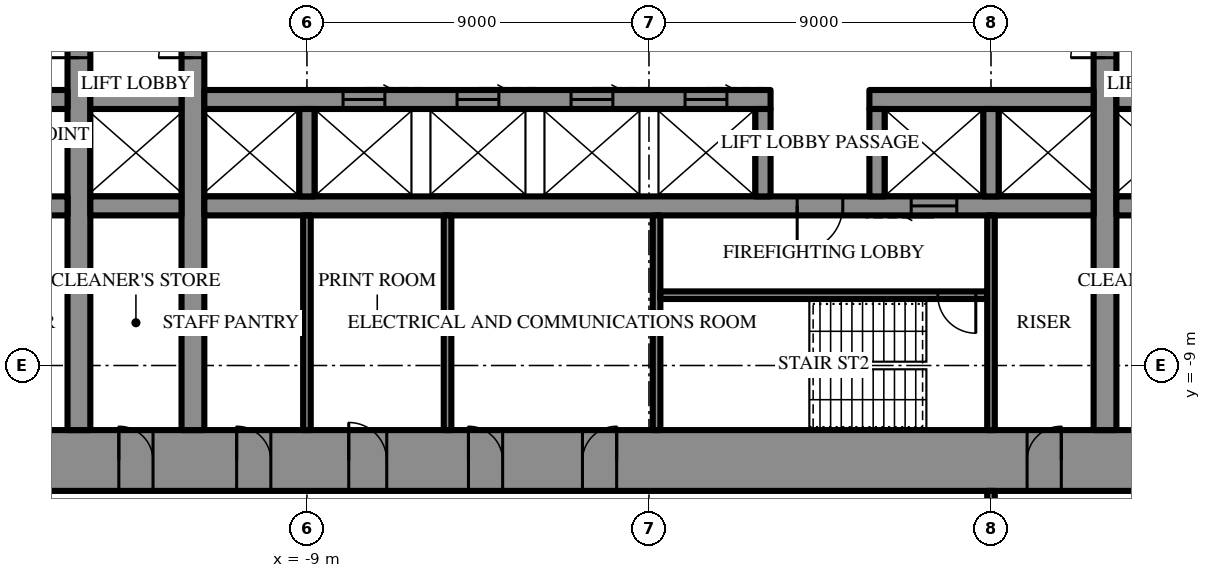
"""IFC4 building model, lengths in metres.
Left out: names, types, materials, properties, quantities, classifications, styles, units other than length and angle.
Written with IfcOpenShell. Run it as: python <this file> out.ifc"""

import sys

from ifc_helpers import new_model, si_unit, direction, frame, frame_2d, origin, place, context, subcontext, project, spatial, rectangle, extrude, element, fill, save


model = new_model("IFC4")
c1 = context("Model", 3, precision=1e-05, world=origin(), true_north=direction((0.0, 1.0)))
c2 = subcontext(c1, "Body", "Model", "MODEL_VIEW")
j1 = project(units=[si_unit("LENGTHUNIT", "METRE"), si_unit("PLANEANGLEUNIT", "RADIAN")], contexts=[c1])
p1 = place(None, origin())
s1 = spatial("IfcSite", under=j1, at=p1, CompositionType="ELEMENT")
p2 = place(p1, origin())
s2 = spatial("IfcBuilding", under=s1, at=p2, CompositionType="ELEMENT")
p3 = place(p2, frame((0.0, 0.0, 161.5)))
s3 = spatial("IfcBuildingStorey", under=s2, at=p3, CompositionType="ELEMENT", Elevation=161.5)
p4 = place(p3, frame((18.6, -11.5, 0.0), z_axis=(0.0, 0.0, 1.0), x_axis=(-1.0, 0.0, 0.0)))
e1 = element("IfcWall", 1, at=p4, inside=s3, PredefinedType="SHEAR", context=c2, shape_type="SweptSolid", body=[
    extrude(rectangle(XDim=37.2, YDim=1.6, at=frame_2d((18.6, 0.0))), origin(), (0.0, 0.0, 1.0), 4.2),
])
p5 = place(p4, frame((19.45, 0.0, 0.0)))
e2 = element("IfcOpeningElement", 2, at=p5, cuts=e1, PredefinedType="OPENING", context=c2, shape_type="SweptSolid", body=[
    extrude(rectangle(XDim=0.9, YDim=2.2, at=frame_2d((0.45, 1.1))), frame((0.0, 0.81, 0.0), z_axis=(0.0, -1.0, 0.0), x_axis=(1.0, 0.0, 0.0)), (0.0, 0.0, 1.0), 1.62),
])
p6 = place(p4, frame((22.45, 0.0, 0.0)))
e3 = element("IfcOpeningElement", 3, at=p6, cuts=e1, PredefinedType="OPENING", context=c2, shape_type="SweptSolid", body=[
    extrude(rectangle(XDim=0.9, YDim=2.2, at=frame_2d((0.45, 1.1))), frame((0.0, 0.81, 0.0), z_axis=(0.0, -1.0, 0.0), x_axis=(1.0, 0.0, 0.0)), (0.0, 0.0, 1.0), 1.62),
])
p7 = place(p4, frame((25.5, 0.0, 0.0)))
e4 = element("IfcOpeningElement", 4, at=p7, cuts=e1, PredefinedType="OPENING", context=c2, shape_type="SweptSolid", body=[
    extrude(rectangle(XDim=1.0, YDim=2.2, at=frame_2d((0.5, 1.1))), frame((0.0, 0.81, 0.0), z_axis=(0.0, -1.0, 0.0), x_axis=(1.0, 0.0, 0.0)), (0.0, 0.0, 1.0), 1.62),
])
p8 = place(p4, frame((1.8, 0.0, 0.0)))
e5 = element("IfcOpeningElement", 5, at=p8, cuts=e1, PredefinedType="OPENING", context=c2, shape_type="SweptSolid", body=[
    extrude(rectangle(XDim=0.9, YDim=2.2, at=frame_2d((0.45, 1.1))), frame((0.0, 0.81, 0.0), z_axis=(0.0, -1.0, 0.0), x_axis=(1.0, 0.0, 0.0)), (0.0, 0.0, 1.0), 1.62),
])
p9 = place(p4, frame((4.65, 0.0, 0.0)))
e6 = element("IfcOpeningElement", 6, at=p9, cuts=e1, PredefinedType="OPENING", context=c2, shape_type="SweptSolid", body=[
    extrude(rectangle(XDim=0.9, YDim=2.2, at=frame_2d((0.45, 1.1))), frame((0.0, 0.81, 0.0), z_axis=(0.0, -1.0, 0.0), x_axis=(1.0, 0.0, 0.0)), (0.0, 0.0, 1.0), 1.62),
])
p10 = place(p4, frame((7.75, 0.0, 0.0)))
e7 = element("IfcOpeningElement", 7, at=p10, cuts=e1, PredefinedType="OPENING", context=c2, shape_type="SweptSolid", body=[
    extrude(rectangle(XDim=0.9, YDim=2.2, at=frame_2d((0.45, 1.1))), frame((0.0, 0.81, 0.0), z_axis=(0.0, -1.0, 0.0), x_axis=(1.0, 0.0, 0.0)), (0.0, 0.0, 1.0), 1.62),
])
p11 = place(p4, frame((28.55, 0.0, 0.0)))
e8 = element("IfcOpeningElement", 8, at=p11, cuts=e1, PredefinedType="OPENING", context=c2, shape_type="SweptSolid", body=[
    extrude(rectangle(XDim=0.9, YDim=2.2, at=frame_2d((0.45, 1.1))), frame((0.0, 0.81, 0.0), z_axis=(0.0, -1.0, 0.0), x_axis=(1.0, 0.0, 0.0)), (0.0, 0.0, 1.0), 1.62),
])
p12 = place(p4, frame((31.65, 0.0, 0.0)))
e9 = element("IfcOpeningElement", 9, at=p12, cuts=e1, PredefinedType="OPENING", context=c2, shape_type="SweptSolid", body=[
    extrude(rectangle(XDim=0.9, YDim=2.2, at=frame_2d((0.45, 1.1))), frame((0.0, 0.81, 0.0), z_axis=(0.0, -1.0, 0.0), x_axis=(1.0, 0.0, 0.0)), (0.0, 0.0, 1.0), 1.62),
])
p13 = place(p4, frame((34.5, 0.0, 0.0)))
e10 = element("IfcOpeningElement", 10, at=p13, cuts=e1, PredefinedType="OPENING", context=c2, shape_type="SweptSolid", body=[
    extrude(rectangle(XDim=0.9, YDim=2.2, at=frame_2d((0.45, 1.1))), frame((0.0, 0.81, 0.0), z_axis=(0.0, -1.0, 0.0), x_axis=(1.0, 0.0, 0.0)), (0.0, 0.0, 1.0), 1.62),
])
p14 = place(p3, frame((12.0, -10.7, 0.0), z_axis=(0.0, 0.0, 1.0), x_axis=(0.0, 1.0, 0.0)))
e11 = element("IfcWall", 11, at=p14, inside=s3, PredefinedType="SHEAR", context=c2, shape_type="SweptSolid", body=[
    extrude(rectangle(XDim=21.4, YDim=0.6, at=frame_2d((10.7, 0.0))), origin(), (0.0, 0.0, 1.0), 4.2),
])
p15 = place(p14, frame((9.8, 0.0, 0.0)))
e12 = element("IfcOpeningElement", 12, at=p15, cuts=e11, PredefinedType="OPENING", context=c2, shape_type="SweptSolid", body=[
    extrude(rectangle(XDim=1.8, YDim=2.4, at=frame_2d((0.9, 1.2))), frame((0.0, 0.31, 0.0), z_axis=(0.0, -1.0, 0.0), x_axis=(1.0, 0.0, 0.0)), (0.0, 0.0, 1.0), 0.62),
])
p16 = place(p3, frame((-12.0, -10.7, 0.0), z_axis=(0.0, 0.0, 1.0), x_axis=(0.0, 1.0, 0.0)))
e13 = element("IfcWall", 13, at=p16, inside=s3, PredefinedType="SHEAR", context=c2, shape_type="SweptSolid", body=[
    extrude(rectangle(XDim=21.4, YDim=0.6, at=frame_2d((10.7, 0.0))), origin(), (0.0, 0.0, 1.0), 4.2),
])
p17 = place(p16, frame((9.8, 0.0, 0.0)))
e14 = element("IfcOpeningElement", 14, at=p17, cuts=e13, PredefinedType="OPENING", context=c2, shape_type="SweptSolid", body=[
    extrude(rectangle(XDim=1.8, YDim=2.4, at=frame_2d((0.9, 1.2))), frame((0.0, 0.31, 0.0), z_axis=(0.0, -1.0, 0.0), x_axis=(1.0, 0.0, 0.0)), (0.0, 0.0, 1.0), 0.62),
])
p18 = place(p3, frame((-15.0, -10.7, 0.0), z_axis=(0.0, 0.0, 1.0), x_axis=(0.0, 1.0, 0.0)))
e15 = element("IfcWall", 15, at=p18, inside=s3, PredefinedType="SHEAR", context=c2, shape_type="SweptSolid", body=[
    extrude(rectangle(XDim=21.4, YDim=0.6, at=frame_2d((10.7, 0.0))), origin(), (0.0, 0.0, 1.0), 4.2),
])
p19 = place(p18, frame((9.8, 0.0, 0.0)))
e16 = element("IfcOpeningElement", 16, at=p19, cuts=e15, PredefinedType="OPENING", context=c2, shape_type="SweptSolid", body=[
    extrude(rectangle(XDim=1.8, YDim=2.4, at=frame_2d((0.9, 1.2))), frame((0.0, 0.31, 0.0), z_axis=(0.0, -1.0, 0.0), x_axis=(1.0, 0.0, 0.0)), (0.0, 0.0, 1.0), 0.62),
])
p20 = place(p3, frame((14.7, -2.0, 0.0), z_axis=(0.0, 0.0, 1.0), x_axis=(-1.0, 0.0, 0.0)))
e17 = element("IfcWall", 17, at=p20, inside=s3, PredefinedType="SHEAR", context=c2, shape_type="SweptSolid", body=[
    extrude(rectangle(XDim=2.4, YDim=0.5, at=frame_2d((1.2, 0.0))), origin(), (0.0, 0.0, 1.0), 4.2),
])
p21 = place(p3, frame((11.7, -2.0, 0.0), z_axis=(0.0, 0.0, 1.0), x_axis=(-1.0, 0.0, 0.0)))
e18 = element("IfcWall", 18, at=p21, inside=s3, PredefinedType="SHEAR", context=c2, shape_type="SweptSolid", body=[
    extrude(rectangle(XDim=5.9, YDim=0.5, at=frame_2d((2.95, 0.0))), origin(), (0.0, 0.0, 1.0), 4.2),
])
p22 = place(p3, frame((3.2, -2.0, 0.0), z_axis=(0.0, 0.0, 1.0), x_axis=(-1.0, 0.0, 0.0)))
e19 = element("IfcWall", 19, at=p22, inside=s3, PredefinedType="SHEAR", context=c2, shape_type="SweptSolid", body=[
    extrude(rectangle(XDim=14.9, YDim=0.5, at=frame_2d((7.45, 0.0))), origin(), (0.0, 0.0, 1.0), 4.2),
])
p23 = place(p22, frame((1.15, 0.0, 0.0)))
e20 = element("IfcOpeningElement", 20, at=p23, cuts=e19, PredefinedType="OPENING", context=c2, shape_type="SweptSolid", body=[
    extrude(rectangle(XDim=1.1, YDim=2.2, at=frame_2d((0.55, 1.1))), frame((0.0, 0.26, 0.0), z_axis=(0.0, -1.0, 0.0), x_axis=(1.0, 0.0, 0.0)), (0.0, 0.0, 1.0), 0.52),
])
p24 = place(p22, frame((4.15, 0.0, 0.0)))
e21 = element("IfcOpeningElement", 21, at=p24, cuts=e19, PredefinedType="OPENING", context=c2, shape_type="SweptSolid", body=[
    extrude(rectangle(XDim=1.1, YDim=2.2, at=frame_2d((0.55, 1.1))), frame((0.0, 0.26, 0.0), z_axis=(0.0, -1.0, 0.0), x_axis=(1.0, 0.0, 0.0)), (0.0, 0.0, 1.0), 0.52),
])
p25 = place(p22, frame((7.15, 0.0, 0.0)))
e22 = element("IfcOpeningElement", 22, at=p25, cuts=e19, PredefinedType="OPENING", context=c2, shape_type="SweptSolid", body=[
    extrude(rectangle(XDim=1.1, YDim=2.2, at=frame_2d((0.55, 1.1))), frame((0.0, 0.26, 0.0), z_axis=(0.0, -1.0, 0.0), x_axis=(1.0, 0.0, 0.0)), (0.0, 0.0, 1.0), 0.52),
])
p26 = place(p22, frame((10.15, 0.0, 0.0)))
e23 = element("IfcOpeningElement", 23, at=p26, cuts=e19, PredefinedType="OPENING", context=c2, shape_type="SweptSolid", body=[
    extrude(rectangle(XDim=1.1, YDim=2.2, at=frame_2d((0.55, 1.1))), frame((0.0, 0.26, 0.0), z_axis=(0.0, -1.0, 0.0), x_axis=(1.0, 0.0, 0.0)), (0.0, 0.0, 1.0), 0.52),
])
p27 = place(p3, frame((-12.3, -2.0, 0.0), z_axis=(0.0, 0.0, 1.0), x_axis=(-1.0, 0.0, 0.0)))
e24 = element("IfcWall", 24, at=p27, inside=s3, PredefinedType="SHEAR", context=c2, shape_type="SweptSolid", body=[
    extrude(rectangle(XDim=2.4, YDim=0.5, at=frame_2d((1.2, 0.0))), origin(), (0.0, 0.0, 1.0), 4.2),
])
p28 = place(p3, frame((-15.3, -2.0, 0.0), z_axis=(0.0, 0.0, 1.0), x_axis=(-1.0, 0.0, 0.0)))
e25 = element("IfcWall", 25, at=p28, inside=s3, PredefinedType="SHEAR", context=c2, shape_type="SweptSolid", body=[
    extrude(rectangle(XDim=2.1, YDim=0.5, at=frame_2d((1.05, 0.0))), origin(), (0.0, 0.0, 1.0), 4.2),
])
p29 = place(p28, frame((0.6, 0.0, 0.0)))
e26 = element("IfcOpeningElement", 26, at=p29, cuts=e25, PredefinedType="OPENING", context=c2, shape_type="SweptSolid", body=[
    extrude(rectangle(XDim=0.9, YDim=2.2, at=frame_2d((0.45, 1.1))), frame((0.0, 0.26, 0.0), z_axis=(0.0, -1.0, 0.0), x_axis=(1.0, 0.0, 0.0)), (0.0, 0.0, 1.0), 0.52),
])
p30 = place(p3, frame((14.7, -4.8, 0.0), z_axis=(0.0, 0.0, 1.0), x_axis=(-1.0, 0.0, 0.0)))
e27 = element("IfcWall", 27, at=p30, inside=s3, PredefinedType="SHEAR", context=c2, shape_type="SweptSolid", body=[
    extrude(rectangle(XDim=2.4, YDim=0.5, at=frame_2d((1.2, 0.0))), origin(), (0.0, 0.0, 1.0), 4.2),
])
p31 = place(p3, frame((11.7, -4.8, 0.0), z_axis=(0.0, 0.0, 1.0), x_axis=(-1.0, 0.0, 0.0)))
e28 = element("IfcWall", 28, at=p31, inside=s3, PredefinedType="SHEAR", context=c2, shape_type="SweptSolid", body=[
    extrude(rectangle(XDim=23.4, YDim=0.5, at=frame_2d((11.7, 0.0))), origin(), (0.0, 0.0, 1.0), 4.2),
])
p32 = place(p31, frame((6.6, 0.0, 0.0)))
e29 = element("IfcOpeningElement", 29, at=p32, cuts=e28, PredefinedType="OPENING", context=c2, shape_type="SweptSolid", body=[
    extrude(rectangle(XDim=1.2, YDim=2.2, at=frame_2d((0.6, 1.1))), frame((0.0, 0.26, 0.0), z_axis=(0.0, -1.0, 0.0), x_axis=(1.0, 0.0, 0.0)), (0.0, 0.0, 1.0), 0.52),
])
p33 = place(p31, frame((3.6, 0.0, 0.0)))
e30 = element("IfcOpeningElement", 30, at=p33, cuts=e28, PredefinedType="OPENING", context=c2, shape_type="SweptSolid", body=[
    extrude(rectangle(XDim=1.2, YDim=2.2, at=frame_2d((0.6, 1.1))), frame((0.0, 0.26, 0.0), z_axis=(0.0, -1.0, 0.0), x_axis=(1.0, 0.0, 0.0)), (0.0, 0.0, 1.0), 0.52),
])
p34 = place(p3, frame((-12.3, -4.8, 0.0), z_axis=(0.0, 0.0, 1.0), x_axis=(-1.0, 0.0, 0.0)))
e31 = element("IfcWall", 31, at=p34, inside=s3, PredefinedType="SHEAR", context=c2, shape_type="SweptSolid", body=[
    extrude(rectangle(XDim=2.4, YDim=0.5, at=frame_2d((1.2, 0.0))), origin(), (0.0, 0.0, 1.0), 4.2),
])
p35 = place(p3, frame((-15.3, -4.8, 0.0), z_axis=(0.0, 0.0, 1.0), x_axis=(-1.0, 0.0, 0.0)))
e32 = element("IfcWall", 32, at=p35, inside=s3, PredefinedType="SHEAR", context=c2, shape_type="SweptSolid", body=[
    extrude(rectangle(XDim=2.1, YDim=0.5, at=frame_2d((1.05, 0.0))), origin(), (0.0, 0.0, 1.0), 4.2),
])
for number, where, z_axis, x_axis in (
    (33, (9.0, -2.25, 0.0), (0.0, 0.0, 1.0), (0.0, -1.0, 0.0)),
    (34, (6.0, -2.25, 0.0), (0.0, 0.0, 1.0), (0.0, -1.0, 0.0)),
    (35, (3.0, -2.25, 0.0), (0.0, 0.0, 1.0), (0.0, -1.0, 0.0)),
    (36, (-9.0, -2.25, 0.0), (0.0, 0.0, 1.0), (0.0, -1.0, 0.0)),
):
    element("IfcWall", number, at=place(p3, frame(where, z_axis=z_axis, x_axis=x_axis)), inside=s3, PredefinedType="SHEAR", context=c2, shape_type="SweptSolid", body=[
        extrude(rectangle(XDim=2.3, YDim=0.4, at=frame_2d((1.15, 0.0))), origin(), (0.0, 0.0, 1.0), 4.2),
    ])
p36 = place(p3, frame((0.2, -5.05, 0.0), z_axis=(0.0, 0.0, 1.0), x_axis=(0.0, -1.0, 0.0)))
e37 = element("IfcWall", 37, at=p36, inside=s3, PredefinedType="SHEAR", context=c2, shape_type="SweptSolid", body=[
    extrude(rectangle(XDim=5.65, YDim=0.2, at=frame_2d((2.825, 0.0))), origin(), (0.0, 0.0, 1.0), 4.2),
])
p37 = place(p3, frame((8.9, -7.15, 0.0), z_axis=(0.0, 0.0, 1.0), x_axis=(-1.0, 0.0, 0.0)))
e38 = element("IfcWall", 38, at=p37, inside=s3, PredefinedType="SHEAR", context=c2, shape_type="SweptSolid", body=[
    extrude(rectangle(XDim=8.6, YDim=0.2, at=frame_2d((4.3, 0.0))), origin(), (0.0, 0.0, 1.0), 4.2),
])
p38 = place(p37, frame((0.3, 0.0, 0.0)))
e39 = element("IfcOpeningElement", 39, at=p38, cuts=e38, PredefinedType="OPENING", context=c2, shape_type="SweptSolid", body=[
    extrude(rectangle(XDim=1.0, YDim=2.2, at=frame_2d((0.5, 1.1))), frame((0.0, 0.11, 0.0), z_axis=(0.0, -1.0, 0.0), x_axis=(1.0, 0.0, 0.0)), (0.0, 0.0, 1.0), 0.22),
])
for number, where, z_axis, x_axis in (
    (40, (9.0, -5.05, 0.0), (0.0, 0.0, 1.0), (0.0, -1.0, 0.0)),
    (41, (-9.0, -5.05, 0.0), (0.0, 0.0, 1.0), (0.0, -1.0, 0.0)),
    (42, (-5.3, -5.05, 0.0), (0.0, 0.0, 1.0), (0.0, -1.0, 0.0)),
):
    element("IfcWall", number, at=place(p3, frame(where, z_axis=z_axis, x_axis=x_axis)), inside=s3, PredefinedType="PARTITIONING", context=c2, shape_type="SweptSolid", body=[
        extrude(rectangle(XDim=5.65, YDim=0.2, at=frame_2d((2.825, 0.0))), origin(), (0.0, 0.0, 1.0), 4.0),
    ])
p39 = place(p3, frame((9.0, -12.3, 0.0), z_axis=(0.0, 0.0, 1.0), x_axis=(0.0, -1.0, 0.0)))
e43 = element("IfcWall", 43, at=p39, inside=s3, PredefinedType="PARTITIONING", context=c2, shape_type="SweptSolid", body=[
    extrude(rectangle(XDim=19.0, YDim=0.2, at=frame_2d((9.5, 0.0))), origin(), (0.0, 0.0, 1.0), 4.0),
])
p40 = place(p39, frame((1.4, 0.0, 0.0)))
e44 = element("IfcOpeningElement", 44, at=p40, cuts=e43, PredefinedType="OPENING", context=c2, shape_type="SweptSolid", body=[
    extrude(rectangle(XDim=1.0, YDim=2.2, at=frame_2d((0.5, 1.1))), frame((0.0, 0.11, 0.0), z_axis=(0.0, -1.0, 0.0), x_axis=(1.0, 0.0, 0.0)), (0.0, 0.0, 1.0), 0.22),
])
p41 = place(p32, origin())
e45 = element("IfcDoor", 45, at=p41, inside=s3, OperationType="SINGLE_SWING_LEFT", PredefinedType="DOOR", context=c2, shape_type="SweptSolid", body=[
    extrude(rectangle(XDim=1.2, YDim=2.2, at=frame_2d((0.6, 1.1))), frame((0.0, 0.025, 0.0), z_axis=(0.0, -1.0, 0.0), x_axis=(1.0, 0.0, 0.0)), (0.0, 0.0, 1.0), 0.05),
])
fill(e29, e45)
p42 = place(p38, origin())
e46 = element("IfcDoor", 46, at=p42, inside=s3, OperationType="SINGLE_SWING_RIGHT", PredefinedType="DOOR", context=c2, shape_type="SweptSolid", body=[
    extrude(rectangle(XDim=1.0, YDim=2.2, at=frame_2d((0.5, 1.1))), frame((0.0, 0.025, 0.0), z_axis=(0.0, -1.0, 0.0), x_axis=(1.0, 0.0, 0.0)), (0.0, 0.0, 1.0), 0.05),
])
fill(e39, e46)
p43 = place(p5, frame((0.9, 0.0, 0.0), z_axis=(0.0, 0.0, 1.0), x_axis=(-1.0, 0.0, 0.0)))
e47 = element("IfcDoor", 47, at=p43, inside=s3, OperationType="SINGLE_SWING_LEFT", PredefinedType="DOOR", context=c2, shape_type="SweptSolid", body=[
    extrude(rectangle(XDim=0.9, YDim=2.2, at=frame_2d((0.45, 1.1))), frame((0.0, 0.025, 0.0), z_axis=(0.0, -1.0, 0.0), x_axis=(1.0, 0.0, 0.0)), (0.0, 0.0, 1.0), 0.05),
])
fill(e2, e47)
p44 = place(p6, frame((0.9, 0.0, 0.0), z_axis=(0.0, 0.0, 1.0), x_axis=(-1.0, 0.0, 0.0)))
e48 = element("IfcDoor", 48, at=p44, inside=s3, OperationType="SINGLE_SWING_RIGHT", PredefinedType="DOOR", context=c2, shape_type="SweptSolid", body=[
    extrude(rectangle(XDim=0.9, YDim=2.2, at=frame_2d((0.45, 1.1))), frame((0.0, 0.025, 0.0), z_axis=(0.0, -1.0, 0.0), x_axis=(1.0, 0.0, 0.0)), (0.0, 0.0, 1.0), 0.05),
])
fill(e3, e48)
p45 = place(p7, frame((1.0, 0.0, 0.0), z_axis=(0.0, 0.0, 1.0), x_axis=(-1.0, 0.0, 0.0)))
e49 = element("IfcDoor", 49, at=p45, inside=s3, OperationType="SINGLE_SWING_RIGHT", PredefinedType="DOOR", context=c2, shape_type="SweptSolid", body=[
    extrude(rectangle(XDim=1.0, YDim=2.2, at=frame_2d((0.5, 1.1))), frame((0.0, 0.025, 0.0), z_axis=(0.0, -1.0, 0.0), x_axis=(1.0, 0.0, 0.0)), (0.0, 0.0, 1.0), 0.05),
])
fill(e4, e49)
p46 = place(p10, frame((0.9, 0.0, 0.0), z_axis=(0.0, 0.0, 1.0), x_axis=(-1.0, 0.0, 0.0)))
e50 = element("IfcDoor", 50, at=p46, inside=s3, OperationType="SINGLE_SWING_LEFT", PredefinedType="DOOR", context=c2, shape_type="SweptSolid", body=[
    extrude(rectangle(XDim=0.9, YDim=2.2, at=frame_2d((0.45, 1.1))), frame((0.0, 0.025, 0.0), z_axis=(0.0, -1.0, 0.0), x_axis=(1.0, 0.0, 0.0)), (0.0, 0.0, 1.0), 0.05),
])
fill(e7, e50)
p47 = place(p11, frame((0.9, 0.0, 0.0), z_axis=(0.0, 0.0, 1.0), x_axis=(-1.0, 0.0, 0.0)))
e51 = element("IfcDoor", 51, at=p47, inside=s3, OperationType="SINGLE_SWING_RIGHT", PredefinedType="DOOR", context=c2, shape_type="SweptSolid", body=[
    extrude(rectangle(XDim=0.9, YDim=2.2, at=frame_2d((0.45, 1.1))), frame((0.0, 0.025, 0.0), z_axis=(0.0, -1.0, 0.0), x_axis=(1.0, 0.0, 0.0)), (0.0, 0.0, 1.0), 0.05),
])
fill(e8, e51)
p48 = place(p12, frame((0.9, 0.0, 0.0), z_axis=(0.0, 0.0, 1.0), x_axis=(-1.0, 0.0, 0.0)))
e52 = element("IfcDoor", 52, at=p48, inside=s3, OperationType="SINGLE_SWING_RIGHT", PredefinedType="DOOR", context=c2, shape_type="SweptSolid", body=[
    extrude(rectangle(XDim=0.9, YDim=2.2, at=frame_2d((0.45, 1.1))), frame((0.0, 0.025, 0.0), z_axis=(0.0, -1.0, 0.0), x_axis=(1.0, 0.0, 0.0)), (0.0, 0.0, 1.0), 0.05),
])
fill(e9, e52)
p49 = place(p15, origin())
e53 = element("IfcDoor", 53, at=p49, inside=s3, OperationType="DOUBLE_DOOR_SINGLE_SWING", PredefinedType="DOOR", context=c2, shape_type="SweptSolid", body=[
    extrude(rectangle(XDim=1.8, YDim=2.4, at=frame_2d((0.9, 1.2))), frame((0.0, 0.025, 0.0), z_axis=(0.0, -1.0, 0.0), x_axis=(1.0, 0.0, 0.0)), (0.0, 0.0, 1.0), 0.05),
])
fill(e12, e53)
p50 = place(p17, origin())
e54 = element("IfcDoor", 54, at=p50, inside=s3, OperationType="DOUBLE_DOOR_SINGLE_SWING", PredefinedType="DOOR", context=c2, shape_type="SweptSolid", body=[
    extrude(rectangle(XDim=1.8, YDim=2.4, at=frame_2d((0.9, 1.2))), frame((0.0, 0.025, 0.0), z_axis=(0.0, -1.0, 0.0), x_axis=(1.0, 0.0, 0.0)), (0.0, 0.0, 1.0), 0.05),
])
fill(e14, e54)
p51 = place(p19, origin())
e55 = element("IfcDoor", 55, at=p51, inside=s3, OperationType="DOUBLE_DOOR_SINGLE_SWING", PredefinedType="DOOR", context=c2, shape_type="SweptSolid", body=[
    extrude(rectangle(XDim=1.8, YDim=2.4, at=frame_2d((0.9, 1.2))), frame((0.0, 0.025, 0.0), z_axis=(0.0, -1.0, 0.0), x_axis=(1.0, 0.0, 0.0)), (0.0, 0.0, 1.0), 0.05),
])
fill(e16, e55)
p52 = place(p33, origin())
e56 = element("IfcDoor", 56, at=p52, inside=s3, OperationType="SLIDING_TO_LEFT", PredefinedType="DOOR", context=c2, shape_type="SweptSolid", body=[
    extrude(rectangle(XDim=1.2, YDim=2.2, at=frame_2d((0.6, 1.1))), frame((0.0, 0.025, 0.0), z_axis=(0.0, -1.0, 0.0), x_axis=(1.0, 0.0, 0.0)), (0.0, 0.0, 1.0), 0.05),
])
fill(e30, e56)
p53 = place(p23, frame((1.1, 0.0, 0.0), z_axis=(0.0, 0.0, 1.0), x_axis=(-1.0, 0.0, 0.0)))
e57 = element("IfcDoor", 57, at=p53, inside=s3, OperationType="SLIDING_TO_LEFT", PredefinedType="DOOR", context=c2, shape_type="SweptSolid", body=[
    extrude(rectangle(XDim=1.1, YDim=2.2, at=frame_2d((0.55, 1.1))), frame((0.0, 0.025, 0.0), z_axis=(0.0, -1.0, 0.0), x_axis=(1.0, 0.0, 0.0)), (0.0, 0.0, 1.0), 0.05),
])
fill(e20, e57)
p54 = place(p24, frame((1.1, 0.0, 0.0), z_axis=(0.0, 0.0, 1.0), x_axis=(-1.0, 0.0, 0.0)))
e58 = element("IfcDoor", 58, at=p54, inside=s3, OperationType="SLIDING_TO_LEFT", PredefinedType="DOOR", context=c2, shape_type="SweptSolid", body=[
    extrude(rectangle(XDim=1.1, YDim=2.2, at=frame_2d((0.55, 1.1))), frame((0.0, 0.025, 0.0), z_axis=(0.0, -1.0, 0.0), x_axis=(1.0, 0.0, 0.0)), (0.0, 0.0, 1.0), 0.05),
])
fill(e21, e58)
p55 = place(p25, frame((1.1, 0.0, 0.0), z_axis=(0.0, 0.0, 1.0), x_axis=(-1.0, 0.0, 0.0)))
e59 = element("IfcDoor", 59, at=p55, inside=s3, OperationType="SLIDING_TO_LEFT", PredefinedType="DOOR", context=c2, shape_type="SweptSolid", body=[
    extrude(rectangle(XDim=1.1, YDim=2.2, at=frame_2d((0.55, 1.1))), frame((0.0, 0.025, 0.0), z_axis=(0.0, -1.0, 0.0), x_axis=(1.0, 0.0, 0.0)), (0.0, 0.0, 1.0), 0.05),
])
fill(e22, e59)
p56 = place(p26, frame((1.1, 0.0, 0.0), z_axis=(0.0, 0.0, 1.0), x_axis=(-1.0, 0.0, 0.0)))
e60 = element("IfcDoor", 60, at=p56, inside=s3, OperationType="SLIDING_TO_LEFT", PredefinedType="DOOR", context=c2, shape_type="SweptSolid", body=[
    extrude(rectangle(XDim=1.1, YDim=2.2, at=frame_2d((0.55, 1.1))), frame((0.0, 0.025, 0.0), z_axis=(0.0, -1.0, 0.0), x_axis=(1.0, 0.0, 0.0)), (0.0, 0.0, 1.0), 0.05),
])
fill(e23, e60)
save(model, sys.argv[1])
